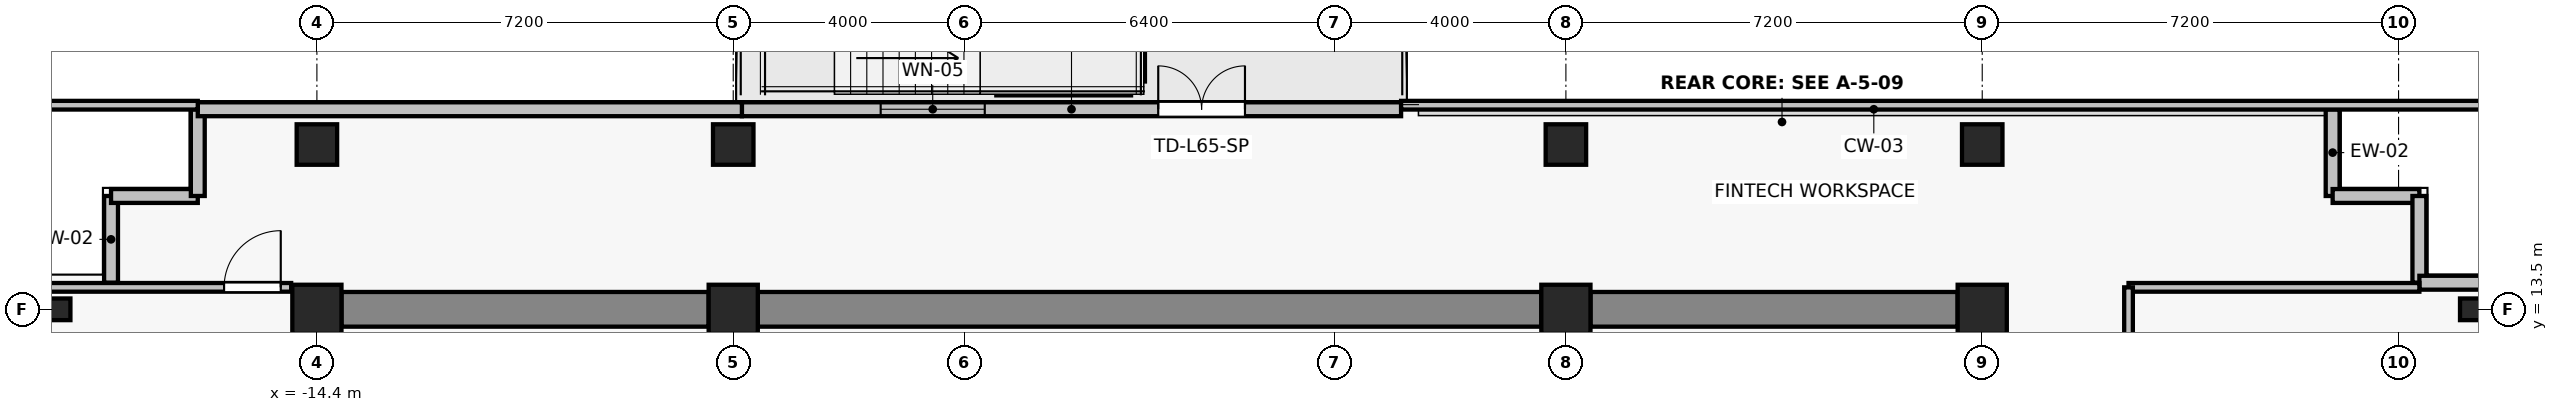
"""IFC4 building model, lengths in metres.
Left out: names, types, materials, properties, quantities, classifications, styles, units other than length and angle.
Written with IfcOpenShell. Run it as: python <this file> out.ifc"""

import sys

from ifc_helpers import new_model, si_unit, direction, frame, frame_2d, origin, origin_2d, place, context, subcontext, project, spatial, rectangle, i_section, extrude, source, transform, mapped, element, fill, save


model = new_model("IFC4")
c1 = context("Model", 3, precision=1e-05, world=origin(), true_north=direction((0.0, 1.0)))
c2 = subcontext(c1, "Body", "Model", "MODEL_VIEW")
j1 = project(units=[si_unit("LENGTHUNIT", "METRE"), si_unit("PLANEANGLEUNIT", "RADIAN")], contexts=[c1])
p1 = place(None, origin())
s1 = spatial("IfcSite", under=j1, at=p1, CompositionType="ELEMENT")
p2 = place(p1, origin())
s2 = spatial("IfcBuilding", under=s1, at=p2, CompositionType="ELEMENT")
p3 = place(p2, frame((0.0, 0.0, 232.0)))
s3 = spatial("IfcBuildingStorey", under=s2, at=p3, CompositionType="ELEMENT", Elevation=232.0)
for number, where, z_axis, x_axis in (
    (1, (-14.4, 13.5, 0.0), (0.0, 0.0, 1.0), (1.0, 0.0, 0.0)),
    (2, (-7.2, 13.5, 0.0), (0.0, 0.0, 1.0), (1.0, 0.0, 0.0)),
    (3, (7.2, 13.5, 0.0), (0.0, 0.0, 1.0), (1.0, 0.0, 0.0)),
    (4, (14.4, 13.5, 0.0), (0.0, 0.0, 1.0), (1.0, 0.0, 0.0)),
):
    element("IfcColumn", number, at=place(p3, frame(where, z_axis=z_axis, x_axis=x_axis)), inside=s3, PredefinedType="COLUMN", context=c2, shape_type="SweptSolid", body=[
        extrude(rectangle(XDim=0.85, YDim=0.85, at=origin_2d()), origin(), (0.0, 0.0, 1.0), 3.3),
    ])
for number, where, z_axis, x_axis in (
    (5, (-14.4, 16.35, 0.0), (0.0, 0.0, 1.0), (1.0, 0.0, 0.0)),
    (6, (-7.2, 16.35, 0.0), (0.0, 0.0, 1.0), (1.0, 0.0, 0.0)),
    (7, (7.2, 16.35, 0.0), (0.0, 0.0, 1.0), (1.0, 0.0, 0.0)),
    (8, (14.4, 16.35, 0.0), (0.0, 0.0, 1.0), (1.0, 0.0, 0.0)),
):
    element("IfcColumn", number, at=place(p3, frame(where, z_axis=z_axis, x_axis=x_axis)), inside=s3, PredefinedType="COLUMN", context=c2, shape_type="SweptSolid", body=[
        extrude(rectangle(XDim=0.7, YDim=0.7, at=origin_2d()), origin(), (0.0, 0.0, 1.0), 3.3),
    ])
for number, where, z_axis, x_axis in (
    (9, (-18.85, 13.5, 0.0), (0.0, 0.0, 1.0), (1.0, 0.0, 0.0)),
    (10, (22.85, 13.5, 0.0), (0.0, 0.0, 1.0), (1.0, 0.0, 0.0)),
):
    element("IfcColumn", number, at=place(p3, frame(where, z_axis=z_axis, x_axis=x_axis)), inside=s3, PredefinedType="COLUMN", context=c2, shape_type="SweptSolid", body=[
        extrude(i_section(OverallWidth=0.375, OverallDepth=0.375, WebThickness=0.017, FlangeThickness=0.027, FilletRadius=0.015, at=origin_2d()), origin(), (0.0, 0.0, 1.0), 3.3),
    ])
p4 = place(p3, frame((-13.975, 13.5, 0.0), z_axis=(0.0, 0.0, 1.0), x_axis=(1.0, 0.0, 0.0)))
e11 = element("IfcWall", 11, at=p4, inside=s3, PredefinedType="SHEAR", context=c2, shape_type="SweptSolid", body=[
    extrude(rectangle(XDim=6.35, YDim=0.6, at=frame_2d((3.175, 0.0))), origin(), (0.0, 0.0, 1.0), 3.075),
])
p5 = place(p3, frame((-6.775, 13.5, 0.0), z_axis=(0.0, 0.0, 1.0), x_axis=(1.0, 0.0, 0.0)))
e12 = element("IfcWall", 12, at=p5, inside=s3, PredefinedType="SHEAR", context=c2, shape_type="SweptSolid", body=[
    extrude(rectangle(XDim=13.55, YDim=0.6, at=frame_2d((6.775, 0.0))), origin(), (0.0, 0.0, 1.0), 3.075),
])
p6 = place(p3, frame((7.625, 13.5, 0.0), z_axis=(0.0, 0.0, 1.0), x_axis=(1.0, 0.0, 0.0)))
e13 = element("IfcWall", 13, at=p6, inside=s3, PredefinedType="SHEAR", context=c2, shape_type="SweptSolid", body=[
    extrude(rectangle(XDim=6.35, YDim=0.6, at=frame_2d((3.175, 0.0))), origin(), (0.0, 0.0, 1.0), 3.075),
])
p7 = place(p3, frame((-7.05, 16.96, 0.0), z_axis=(0.0, 0.0, 1.0), x_axis=(1.0, 0.0, 0.0)))
e14 = element("IfcWall", 14, at=p7, inside=s3, PredefinedType="SOLIDWALL", context=c2, shape_type="SweptSolid", body=[
    extrude(rectangle(XDim=11.4, YDim=0.24, at=frame_2d((5.7, 0.0))), origin(), (0.0, 0.0, 1.0), 2.59),
])
p8 = place(p7, frame((7.2, 0.0, 0.0)))
e15 = element("IfcOpeningElement", 15, at=p8, cuts=e14, PredefinedType="OPENING", context=c2, shape_type="SweptSolid", body=[
    extrude(rectangle(XDim=1.5, YDim=2.2, at=frame_2d((0.75, 1.1))), frame((0.0, 0.13, 0.0), z_axis=(0.0, -1.0, 0.0), x_axis=(1.0, 0.0, 0.0)), (0.0, 0.0, 1.0), 0.26),
])
p9 = place(p7, frame((2.4, 0.0, 0.85)))
e16 = element("IfcOpeningElement", 16, at=p9, cuts=e14, PredefinedType="OPENING", context=c2, shape_type="SweptSolid", body=[
    extrude(rectangle(XDim=1.8, YDim=1.6, at=frame_2d((0.9, 0.8))), frame((0.0, 0.13, 0.0), z_axis=(0.0, -1.0, 0.0), x_axis=(1.0, 0.0, 0.0)), (0.0, 0.0, 1.0), 0.26),
])
for number, where, z_axis, x_axis in (
    (17, (-17.96, 15.46, 0.0), (0.0, 0.0, 1.0), (0.0, -1.0, 0.0)),
    (18, (-16.46, 15.46, 0.0), (0.0, 0.0, 1.0), (-1.0, 0.0, 0.0)),
    (19, (-16.46, 16.96, 0.0), (0.0, 0.0, 1.0), (0.0, -1.0, 0.0)),
):
    element("IfcWall", number, at=place(p3, frame(where, z_axis=z_axis, x_axis=x_axis)), inside=s3, PredefinedType="SOLIDWALL", context=c2, shape_type="SweptSolid", body=[
        extrude(rectangle(XDim=1.5, YDim=0.24, at=frame_2d((0.75, 0.0))), origin(), (0.0, 0.0, 1.0), 3.075),
    ])
p10 = place(p3, frame((-7.05, 16.96, 0.0), z_axis=(0.0, 0.0, 1.0), x_axis=(-1.0, 0.0, 0.0)))
e20 = element("IfcWall", 20, at=p10, inside=s3, PredefinedType="SOLIDWALL", context=c2, shape_type="SweptSolid", body=[
    extrude(rectangle(XDim=9.41, YDim=0.24, at=frame_2d((4.705, 0.0))), origin(), (0.0, 0.0, 1.0), 2.59),
])
for number, where, z_axis, x_axis in (
    (21, (20.46, 15.46, 0.0), (0.0, 0.0, 1.0), (0.0, 1.0, 0.0)),
    (22, (21.96, 15.46, 0.0), (0.0, 0.0, 1.0), (-1.0, 0.0, 0.0)),
    (23, (21.96, 13.96, 0.0), (0.0, 0.0, 1.0), (0.0, 1.0, 0.0)),
    (24, (23.46, 13.96, 0.0), (0.0, 0.0, 1.0), (-1.0, 0.0, 0.0)),
):
    element("IfcWall", number, at=place(p3, frame(where, z_axis=z_axis, x_axis=x_axis)), inside=s3, PredefinedType="SOLIDWALL", context=c2, shape_type="SweptSolid", body=[
        extrude(rectangle(XDim=1.5, YDim=0.24, at=frame_2d((0.75, 0.0))), origin(), (0.0, 0.0, 1.0), 3.075),
    ])
p11 = place(p3, frame((-0.18, 17.44, -0.25), z_axis=(0.0, 0.0, 1.0), x_axis=(0.0, 1.0, 0.0)))
e25 = element("IfcWall", 25, at=p11, inside=s3, PredefinedType="SOLIDWALL", context=c2, shape_type="SweptSolid", body=[
    extrude(rectangle(XDim=2.18, YDim=0.2, at=frame_2d((1.09, 0.0))), origin(), (0.0, 0.0, 1.0), 1.7),
])
p12 = place(p3, frame((-2.65, 17.3, -0.25), z_axis=(0.0, 0.0, 1.0), x_axis=(1.0, 0.0, 0.0)))
e26 = element("IfcWall", 26, at=p12, inside=s3, PredefinedType="SOLIDWALL", context=c2, shape_type="SweptSolid", body=[
    extrude(rectangle(XDim=2.33, YDim=0.2, at=frame_2d((1.165, 0.0))), origin(), (0.0, 0.0, 1.0), 1.7),
])
p13 = place(p3, frame((-19.53, 13.88, 0.0), z_axis=(0.0, 0.0, 1.0), x_axis=(1.0, 0.0, 0.0)))
e27 = element("IfcWall", 27, at=p13, inside=s3, PredefinedType="PARTITIONING", context=c2, shape_type="SweptSolid", body=[
    extrude(rectangle(XDim=4.685, YDim=0.15, at=frame_2d((2.343, 0.0))), origin(), (0.0, 0.0, 1.0), 3.075),
])
p14 = place(p13, frame((3.525, 0.0, 0.0)))
e28 = element("IfcOpeningElement", 28, at=p14, cuts=e27, PredefinedType="OPENING", context=c2, shape_type="SweptSolid", body=[
    extrude(rectangle(XDim=0.98, YDim=2.15, at=frame_2d((0.49, 1.075))), frame((0.0, 0.085, 0.0), z_axis=(0.0, -1.0, 0.0), x_axis=(1.0, 0.0, 0.0)), (0.0, 0.0, 1.0), 0.17),
])
p15 = place(p3, frame((16.93, 13.88, 0.0), z_axis=(0.0, 0.0, 1.0), x_axis=(1.0, 0.0, 0.0)))
e29 = element("IfcWall", 29, at=p15, inside=s3, PredefinedType="PARTITIONING", context=c2, shape_type="SweptSolid", body=[
    extrude(rectangle(XDim=5.03, YDim=0.15, at=frame_2d((2.515, 0.0))), origin(), (0.0, 0.0, 1.0), 3.075),
])
p16 = place(p3, frame((16.93, -1.77, 0.0), z_axis=(0.0, 0.0, 1.0), x_axis=(0.0, 1.0, 0.0)))
e30 = element("IfcWall", 30, at=p16, inside=s3, PredefinedType="PARTITIONING", context=c2, shape_type="SweptSolid", body=[
    extrude(rectangle(XDim=15.65, YDim=0.15, at=frame_2d((7.825, 0.0))), origin(), (0.0, 0.0, 1.0), 2.615),
])
p17 = place(p16, frame((7.335, 0.0, 0.0)))
e31 = element("IfcOpeningElement", 31, at=p17, cuts=e30, PredefinedType="OPENING", context=c2, shape_type="SweptSolid", body=[
    extrude(rectangle(XDim=0.98, YDim=2.15, at=frame_2d((0.49, 1.075))), frame((0.0, 0.085, 0.0), z_axis=(0.0, -1.0, 0.0), x_axis=(1.0, 0.0, 0.0)), (0.0, 0.0, 1.0), 0.17),
])
p18 = place(p3, frame((-19.53, 17.03, 0.0), z_axis=(0.0, 0.0, 1.0), x_axis=(1.0, 0.0, 0.0)))
e32 = element("IfcWall", 32, at=p18, inside=s3, PredefinedType="PARTITIONING", context=c2, shape_type="SweptSolid", body=[
    extrude(rectangle(XDim=3.07, YDim=0.15, at=frame_2d((1.535, 0.0))), origin(), (0.0, 0.0, 1.0), 2.59),
])
p19 = place(p3, frame((4.35, 17.03, 0.0), z_axis=(0.0, 0.0, 1.0), x_axis=(1.0, 0.0, 0.0)))
e33 = element("IfcWall", 33, at=p19, inside=s3, PredefinedType="PARTITIONING", context=c2, shape_type="SweptSolid", body=[
    extrude(rectangle(XDim=19.18, YDim=0.15, at=frame_2d((9.59, 0.0))), origin(), (0.0, 0.0, 1.0), 2.59),
])
m1 = source(origin(), c2, "Body", "SweptSolid", [
    extrude(rectangle(XDim=1.5, YDim=2.2, at=frame_2d((0.75, 1.1))), frame((0.0, 0.025, 0.0), z_axis=(0.0, -1.0, 0.0), x_axis=(1.0, 0.0, 0.0)), (0.0, 0.0, 1.0), 0.05),
])
p20 = place(p8, origin())
e34 = element("IfcDoor", 34, at=p20, inside=s3, OperationType="DOUBLE_DOOR_SINGLE_SWING", PredefinedType="DOOR", context=c2, shape_type="MappedRepresentation", body=[
    mapped(m1, transform((0.0, 0.0, 0.0), x_axis=(1.0, 0.0, 0.0), y_axis=(0.0, 1.0, 0.0), z_axis=(0.0, 0.0, 1.0), scale=1.0)),
])
fill(e15, e34)
m2 = source(origin(), c2, "Body", "SweptSolid", [
    extrude(rectangle(XDim=1.8, YDim=1.6, at=frame_2d((0.9, 0.8))), frame((0.0, 0.03, 0.0), z_axis=(0.0, -1.0, 0.0), x_axis=(1.0, 0.0, 0.0)), (0.0, 0.0, 1.0), 0.06),
])
p21 = place(p9, origin())
e35 = element("IfcWindow", 35, at=p21, inside=s3, PartitioningType="SINGLE_PANEL", PredefinedType="WINDOW", context=c2, shape_type="MappedRepresentation", body=[
    mapped(m2, transform((0.0, 0.0, 0.0), x_axis=(1.0, 0.0, 0.0), y_axis=(0.0, 1.0, 0.0), z_axis=(0.0, 0.0, 1.0), scale=1.0)),
])
fill(e16, e35)
m3 = source(origin(), c2, "Body", "SweptSolid", [
    extrude(rectangle(XDim=0.98, YDim=2.15, at=frame_2d((0.49, 1.075))), frame((0.0, 0.025, 0.0), z_axis=(0.0, -1.0, 0.0), x_axis=(1.0, 0.0, 0.0)), (0.0, 0.0, 1.0), 0.05),
])
p22 = place(p14, origin())
e36 = element("IfcDoor", 36, at=p22, inside=s3, OperationType="SINGLE_SWING_RIGHT", PredefinedType="DOOR", context=c2, shape_type="MappedRepresentation", body=[
    mapped(m3, transform((0.0, 0.0, 0.0), x_axis=(1.0, 0.0, 0.0), y_axis=(0.0, 1.0, 0.0), z_axis=(0.0, 0.0, 1.0), scale=1.0)),
])
fill(e28, e36)
save(model, sys.argv[1])
